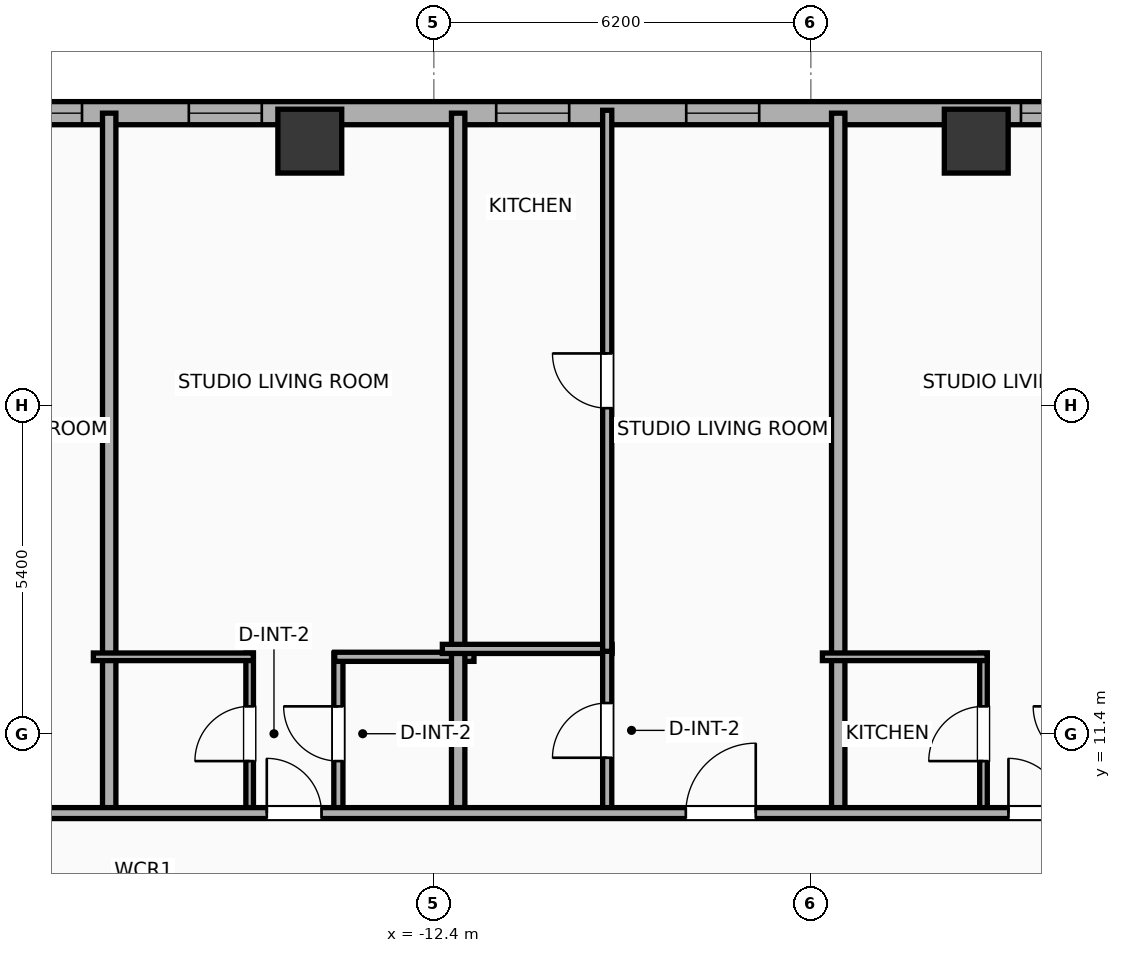
"""IFC4 building model, lengths in metres.
Left out: names, types, materials, properties, quantities, classifications, styles, units other than length and angle.
Written with IfcOpenShell. Run it as: python <this file> out.ifc"""

import sys

from ifc_helpers import new_model, si_unit, direction, frame, frame_2d, origin, origin_2d, place, context, subcontext, project, spatial, rectangle, hollow_rectangle, extrude, element, fill, save


model = new_model("IFC4")
c1 = context("Model", 3, precision=1e-05, world=origin(), true_north=direction((0.0, 1.0)))
c2 = subcontext(c1, "Body", "Model", "MODEL_VIEW")
j1 = project(units=[si_unit("LENGTHUNIT", "METRE"), si_unit("PLANEANGLEUNIT", "RADIAN")], contexts=[c1])
p1 = place(None, origin())
s1 = spatial("IfcSite", under=j1, at=p1, CompositionType="ELEMENT")
p2 = place(p1, origin())
s2 = spatial("IfcBuilding", under=s1, at=p2, CompositionType="ELEMENT")
p3 = place(p2, frame((0.0, 0.0, 124.8)))
s3 = spatial("IfcBuildingStorey", under=s2, at=p3, CompositionType="ELEMENT", Elevation=124.8)
for number, where, z_axis, x_axis in (
    (1, (-3.48, 21.15, 0.0), (0.0, 0.0, 1.0), (1.0, 0.0, 0.0)),
    (2, (-14.44, 21.15, 0.0), (0.0, 0.0, 1.0), (1.0, 0.0, 0.0)),
):
    element("IfcColumn", number, at=place(p3, frame(where, z_axis=z_axis, x_axis=x_axis)), inside=s3, PredefinedType="COLUMN", context=c2, shape_type="SweptSolid", body=[
        extrude(hollow_rectangle(XDim=1.05, YDim=1.05, WallThickness=0.036, at=origin_2d()), origin(), (0.0, 0.0, 1.0), 3.9),
    ])
p4 = place(p3, frame((-25.381, 21.61, 0.0), z_axis=(0.0, 0.0, 1.0), x_axis=(1.0, 0.0, 0.0)))
e3 = element("IfcWall", 3, at=p4, inside=s3, PredefinedType="ELEMENTEDWALL", context=c2, shape_type="SweptSolid", body=[
    extrude(rectangle(XDim=54.763, YDim=0.38, at=frame_2d((27.381, 0.0))), origin(), (0.0, 0.0, 1.0), 3.65),
])
p5 = place(p4, frame((4.795, 0.0, 0.75)))
e4 = element("IfcOpeningElement", 4, at=p5, cuts=e3, PredefinedType="OPENING", context=c2, shape_type="SweptSolid", body=[
    extrude(rectangle(XDim=2.4, YDim=2.1, at=frame_2d((1.2, 1.05))), frame((0.0, 0.2, 0.0), z_axis=(0.0, -1.0, 0.0), x_axis=(1.0, 0.0, 0.0)), (0.0, 0.0, 1.0), 0.4),
])
p6 = place(p4, frame((45.867, 0.0, 0.75)))
e5 = element("IfcOpeningElement", 5, at=p6, cuts=e3, PredefinedType="OPENING", context=c2, shape_type="SweptSolid", body=[
    extrude(rectangle(XDim=2.4, YDim=2.1, at=frame_2d((1.2, 1.05))), frame((0.0, 0.2, 0.0), z_axis=(0.0, -1.0, 0.0), x_axis=(1.0, 0.0, 0.0)), (0.0, 0.0, 1.0), 0.4),
])
p7 = place(p4, frame((2.408, 0.0, 0.75)))
e6 = element("IfcOpeningElement", 6, at=p7, cuts=e3, PredefinedType="OPENING", context=c2, shape_type="SweptSolid", body=[
    extrude(rectangle(XDim=1.2, YDim=2.05, at=frame_2d((0.6, 1.025))), frame((0.0, 0.2, 0.0), z_axis=(0.0, -1.0, 0.0), x_axis=(1.0, 0.0, 0.0)), (0.0, 0.0, 1.0), 0.4),
])
p8 = place(p4, frame((8.952, 0.0, 0.75)))
e7 = element("IfcOpeningElement", 7, at=p8, cuts=e3, PredefinedType="OPENING", context=c2, shape_type="SweptSolid", body=[
    extrude(rectangle(XDim=1.2, YDim=2.05, at=frame_2d((0.6, 1.025))), frame((0.0, 0.2, 0.0), z_axis=(0.0, -1.0, 0.0), x_axis=(1.0, 0.0, 0.0)), (0.0, 0.0, 1.0), 0.4),
])
p9 = place(p4, frame((17.132, 0.0, 0.75)))
e8 = element("IfcOpeningElement", 8, at=p9, cuts=e3, PredefinedType="OPENING", context=c2, shape_type="SweptSolid", body=[
    extrude(rectangle(XDim=1.2, YDim=2.05, at=frame_2d((0.6, 1.025))), frame((0.0, 0.2, 0.0), z_axis=(0.0, -1.0, 0.0), x_axis=(1.0, 0.0, 0.0)), (0.0, 0.0, 1.0), 0.4),
])
p10 = place(p4, frame((14.007, 0.0, 0.75)))
e9 = element("IfcOpeningElement", 9, at=p10, cuts=e3, PredefinedType="OPENING", context=c2, shape_type="SweptSolid", body=[
    extrude(rectangle(XDim=1.2, YDim=2.05, at=frame_2d((0.6, 1.025))), frame((0.0, 0.2, 0.0), z_axis=(0.0, -1.0, 0.0), x_axis=(1.0, 0.0, 0.0)), (0.0, 0.0, 1.0), 0.4),
])
p11 = place(p4, frame((22.636, 0.0, 0.75)))
e10 = element("IfcOpeningElement", 10, at=p11, cuts=e3, PredefinedType="OPENING", context=c2, shape_type="SweptSolid", body=[
    extrude(rectangle(XDim=1.2, YDim=2.05, at=frame_2d((0.6, 1.025))), frame((0.0, 0.2, 0.0), z_axis=(0.0, -1.0, 0.0), x_axis=(1.0, 0.0, 0.0)), (0.0, 0.0, 1.0), 0.4),
])
p12 = place(p4, frame((27.129, 0.0, 0.75)))
e11 = element("IfcOpeningElement", 11, at=p12, cuts=e3, PredefinedType="OPENING", context=c2, shape_type="SweptSolid", body=[
    extrude(rectangle(XDim=1.2, YDim=2.05, at=frame_2d((0.6, 1.025))), frame((0.0, 0.2, 0.0), z_axis=(0.0, -1.0, 0.0), x_axis=(1.0, 0.0, 0.0)), (0.0, 0.0, 1.0), 0.4),
])
p13 = place(p4, frame((30.254, 0.0, 0.75)))
e12 = element("IfcOpeningElement", 12, at=p13, cuts=e3, PredefinedType="OPENING", context=c2, shape_type="SweptSolid", body=[
    extrude(rectangle(XDim=1.2, YDim=2.05, at=frame_2d((0.6, 1.025))), frame((0.0, 0.2, 0.0), z_axis=(0.0, -1.0, 0.0), x_axis=(1.0, 0.0, 0.0)), (0.0, 0.0, 1.0), 0.4),
])
p14 = place(p4, frame((33.603, 0.0, 0.75)))
e13 = element("IfcOpeningElement", 13, at=p14, cuts=e3, PredefinedType="OPENING", context=c2, shape_type="SweptSolid", body=[
    extrude(rectangle(XDim=1.2, YDim=2.05, at=frame_2d((0.6, 1.025))), frame((0.0, 0.2, 0.0), z_axis=(0.0, -1.0, 0.0), x_axis=(1.0, 0.0, 0.0)), (0.0, 0.0, 1.0), 0.4),
])
p15 = place(p4, frame((36.608, 0.0, 0.75)))
e14 = element("IfcOpeningElement", 14, at=p15, cuts=e3, PredefinedType="OPENING", context=c2, shape_type="SweptSolid", body=[
    extrude(rectangle(XDim=1.2, YDim=2.05, at=frame_2d((0.6, 1.025))), frame((0.0, 0.2, 0.0), z_axis=(0.0, -1.0, 0.0), x_axis=(1.0, 0.0, 0.0)), (0.0, 0.0, 1.0), 0.4),
])
p16 = place(p4, frame((39.446, 0.0, 0.75)))
e15 = element("IfcOpeningElement", 15, at=p16, cuts=e3, PredefinedType="OPENING", context=c2, shape_type="SweptSolid", body=[
    extrude(rectangle(XDim=1.2, YDim=2.05, at=frame_2d((0.6, 1.025))), frame((0.0, 0.2, 0.0), z_axis=(0.0, -1.0, 0.0), x_axis=(1.0, 0.0, 0.0)), (0.0, 0.0, 1.0), 0.4),
])
p17 = place(p4, frame((42.27, 0.0, 0.75)))
e16 = element("IfcOpeningElement", 16, at=p17, cuts=e3, PredefinedType="OPENING", context=c2, shape_type="SweptSolid", body=[
    extrude(rectangle(XDim=0.85, YDim=2.05, at=frame_2d((0.425, 1.025))), frame((0.0, 0.2, 0.0), z_axis=(0.0, -1.0, 0.0), x_axis=(1.0, 0.0, 0.0)), (0.0, 0.0, 1.0), 0.4),
])
p18 = place(p4, frame((49.554, 0.0, 0.75)))
e17 = element("IfcOpeningElement", 17, at=p18, cuts=e3, PredefinedType="OPENING", context=c2, shape_type="SweptSolid", body=[
    extrude(rectangle(XDim=1.2, YDim=2.05, at=frame_2d((0.6, 1.025))), frame((0.0, 0.2, 0.0), z_axis=(0.0, -1.0, 0.0), x_axis=(1.0, 0.0, 0.0)), (0.0, 0.0, 1.0), 0.4),
])
p19 = place(p4, frame((52.266, 0.0, 0.75)))
e18 = element("IfcOpeningElement", 18, at=p19, cuts=e3, PredefinedType="OPENING", context=c2, shape_type="SweptSolid", body=[
    extrude(rectangle(XDim=1.2, YDim=2.05, at=frame_2d((0.6, 1.025))), frame((0.0, 0.2, 0.0), z_axis=(0.0, -1.0, 0.0), x_axis=(1.0, 0.0, 0.0)), (0.0, 0.0, 1.0), 0.4),
])
p20 = place(p3, frame((-17.739, 10.02, 0.0), z_axis=(0.0, 0.0, 1.0), x_axis=(0.0, 1.0, 0.0)))
e19 = element("IfcWall", 19, at=p20, inside=s3, PredefinedType="PARTITIONING", context=c2, shape_type="SweptSolid", body=[
    extrude(rectangle(XDim=11.59, YDim=0.22, at=frame_2d((5.795, 0.0))), origin(), (0.0, 0.0, 1.0), 3.65),
])
p21 = place(p3, frame((-15.429, 10.08, 0.0), z_axis=(0.0, 0.0, 1.0), x_axis=(0.0, 1.0, 0.0)))
e20 = element("IfcWall", 20, at=p21, inside=s3, PredefinedType="PARTITIONING", context=c2, shape_type="SweptSolid", body=[
    extrude(rectangle(XDim=2.65, YDim=0.125, at=frame_2d((1.325, 0.0))), origin(), (0.0, 0.0, 1.0), 3.04),
])
p22 = place(p21, frame((0.875, 0.0, 0.0)))
e21 = element("IfcOpeningElement", 21, at=p22, cuts=e20, PredefinedType="OPENING", context=c2, shape_type="SweptSolid", body=[
    extrude(rectangle(XDim=0.9, YDim=2.05, at=frame_2d((0.45, 1.025))), frame((0.0, 0.073, 0.0), z_axis=(0.0, -1.0, 0.0), x_axis=(1.0, 0.0, 0.0)), (0.0, 0.0, 1.0), 0.145),
])
p23 = place(p3, frame((-13.97, 10.08, 0.0), z_axis=(0.0, 0.0, 1.0), x_axis=(0.0, 1.0, 0.0)))
e22 = element("IfcWall", 22, at=p23, inside=s3, PredefinedType="PLUMBINGWALL", context=c2, shape_type="SweptSolid", body=[
    extrude(rectangle(XDim=2.65, YDim=0.15, at=frame_2d((1.325, 0.0))), origin(), (0.0, 0.0, 1.0), 3.65),
])
p24 = place(p23, frame((0.875, 0.0, 0.0)))
e23 = element("IfcOpeningElement", 23, at=p24, cuts=e22, PredefinedType="OPENING", context=c2, shape_type="SweptSolid", body=[
    extrude(rectangle(XDim=0.9, YDim=2.05, at=frame_2d((0.45, 1.025))), frame((0.0, 0.085, 0.0), z_axis=(0.0, -1.0, 0.0), x_axis=(1.0, 0.0, 0.0)), (0.0, 0.0, 1.0), 0.17),
])
p25 = place(p3, frame((-17.999, 12.67, 0.0), z_axis=(0.0, 0.0, 1.0), x_axis=(1.0, 0.0, 0.0)))
e24 = element("IfcWall", 24, at=p25, inside=s3, PredefinedType="PARTITIONING", context=c2, shape_type="SweptSolid", body=[
    extrude(rectangle(XDim=2.63, YDim=0.125, at=frame_2d((1.315, 0.0))), origin(), (0.0, 0.0, 1.0), 3.65),
])
p26 = place(p3, frame((-14.03, 12.67, 0.0), z_axis=(0.0, 0.0, 1.0), x_axis=(1.0, 0.0, 0.0)))
e25 = element("IfcWall", 25, at=p26, inside=s3, PredefinedType="PLUMBINGWALL", context=c2, shape_type="SweptSolid", body=[
    extrude(rectangle(XDim=2.29, YDim=0.15, at=frame_2d((1.145, 0.0))), origin(), (0.0, 0.0, 1.0), 3.65),
])
p27 = place(p3, frame((-12.0, 10.02, 0.0), z_axis=(0.0, 0.0, 1.0), x_axis=(0.0, 1.0, 0.0)))
e26 = element("IfcWall", 26, at=p27, inside=s3, PredefinedType="PARTITIONING", context=c2, shape_type="SweptSolid", body=[
    extrude(rectangle(XDim=11.59, YDim=0.22, at=frame_2d((5.795, 0.0))), origin(), (0.0, 0.0, 1.0), 3.65),
])
p28 = place(p3, frame((-12.26, 12.8, 0.0), z_axis=(0.0, 0.0, 1.0), x_axis=(1.0, 0.0, 0.0)))
e27 = element("IfcWall", 27, at=p28, inside=s3, PredefinedType="PLUMBINGWALL", context=c2, shape_type="SweptSolid", body=[
    extrude(rectangle(XDim=2.791, YDim=0.15, at=frame_2d((1.396, 0.0))), origin(), (0.0, 0.0, 1.0), 3.65),
])
p29 = place(p3, frame((-9.549, 10.08, 0.0), z_axis=(0.0, 0.0, 1.0), x_axis=(0.0, 1.0, 0.0)))
e28 = element("IfcWall", 28, at=p29, inside=s3, PredefinedType="PLUMBINGWALL", context=c2, shape_type="SweptSolid", body=[
    extrude(rectangle(XDim=2.76, YDim=0.15, at=frame_2d((1.38, 0.0))), origin(), (0.0, 0.0, 1.0), 3.65),
])
p30 = place(p29, frame((0.93, 0.0, 0.0)))
e29 = element("IfcOpeningElement", 29, at=p30, cuts=e28, PredefinedType="OPENING", context=c2, shape_type="SweptSolid", body=[
    extrude(rectangle(XDim=0.9, YDim=2.05, at=frame_2d((0.45, 1.025))), frame((0.0, 0.085, 0.0), z_axis=(0.0, -1.0, 0.0), x_axis=(1.0, 0.0, 0.0)), (0.0, 0.0, 1.0), 0.17),
])
p31 = place(p3, frame((-9.549, 12.76, 0.0), z_axis=(0.0, 0.0, 1.0), x_axis=(0.0, 1.0, 0.0)))
e30 = element("IfcWall", 30, at=p31, inside=s3, PredefinedType="PLUMBINGWALL", context=c2, shape_type="SweptSolid", body=[
    extrude(rectangle(XDim=8.898, YDim=0.15, at=frame_2d((4.449, 0.0))), origin(), (0.0, 0.0, 1.0), 3.65),
])
p32 = place(p31, frame((3.999, 0.0, 0.0)))
e31 = element("IfcOpeningElement", 31, at=p32, cuts=e30, PredefinedType="OPENING", context=c2, shape_type="SweptSolid", body=[
    extrude(rectangle(XDim=0.9, YDim=2.05, at=frame_2d((0.45, 1.025))), frame((0.0, 0.085, 0.0), z_axis=(0.0, -1.0, 0.0), x_axis=(1.0, 0.0, 0.0)), (0.0, 0.0, 1.0), 0.17),
])
p33 = place(p3, frame((-5.75, 10.02, 0.0), z_axis=(0.0, 0.0, 1.0), x_axis=(0.0, 1.0, 0.0)))
e32 = element("IfcWall", 32, at=p33, inside=s3, PredefinedType="PARTITIONING", context=c2, shape_type="SweptSolid", body=[
    extrude(rectangle(XDim=11.59, YDim=0.22, at=frame_2d((5.795, 0.0))), origin(), (0.0, 0.0, 1.0), 3.65),
])
p34 = place(p3, frame((-3.361, 10.08, 0.0), z_axis=(0.0, 0.0, 1.0), x_axis=(0.0, 1.0, 0.0)))
e33 = element("IfcWall", 33, at=p34, inside=s3, PredefinedType="PARTITIONING", context=c2, shape_type="SweptSolid", body=[
    extrude(rectangle(XDim=2.65, YDim=0.125, at=frame_2d((1.325, 0.0))), origin(), (0.0, 0.0, 1.0), 3.65),
])
p35 = place(p34, frame((0.875, 0.0, 0.0)))
e34 = element("IfcOpeningElement", 34, at=p35, cuts=e33, PredefinedType="OPENING", context=c2, shape_type="SweptSolid", body=[
    extrude(rectangle(XDim=0.9, YDim=2.05, at=frame_2d((0.45, 1.025))), frame((0.0, 0.073, 0.0), z_axis=(0.0, -1.0, 0.0), x_axis=(1.0, 0.0, 0.0)), (0.0, 0.0, 1.0), 0.145),
])
p36 = place(p3, frame((-6.01, 12.67, 0.0), z_axis=(0.0, 0.0, 1.0), x_axis=(1.0, 0.0, 0.0)))
e35 = element("IfcWall", 35, at=p36, inside=s3, PredefinedType="PARTITIONING", context=c2, shape_type="SweptSolid", body=[
    extrude(rectangle(XDim=2.709, YDim=0.125, at=frame_2d((1.354, 0.0))), origin(), (0.0, 0.0, 1.0), 3.65),
])
p37 = place(p3, frame((-29.21, 10.1, 0.0), z_axis=(0.0, 0.0, 1.0), x_axis=(1.0, 0.0, 0.0)))
e36 = element("IfcWall", 36, at=p37, inside=s3, PredefinedType="PARTITIONING", context=c2, shape_type="SweptSolid", body=[
    extrude(rectangle(XDim=62.42, YDim=0.18, at=frame_2d((31.21, 0.0))), origin(), (0.0, 0.0, 1.0), 3.65),
])
p38 = place(p37, frame((2.54, 0.0, 0.0)))
e37 = element("IfcOpeningElement", 37, at=p38, cuts=e36, PredefinedType="OPENING", context=c2, shape_type="SweptSolid", body=[
    extrude(rectangle(XDim=0.9, YDim=2.05, at=frame_2d((0.45, 1.025))), frame((0.0, 0.1, 0.0), z_axis=(0.0, -1.0, 0.0), x_axis=(1.0, 0.0, 0.0)), (0.0, 0.0, 1.0), 0.2),
])
p39 = place(p37, frame((9.1, 0.0, 0.0)))
e38 = element("IfcOpeningElement", 38, at=p39, cuts=e36, PredefinedType="OPENING", context=c2, shape_type="SweptSolid", body=[
    extrude(rectangle(XDim=1.15, YDim=2.05, at=frame_2d((0.575, 1.025))), frame((0.0, 0.1, 0.0), z_axis=(0.0, -1.0, 0.0), x_axis=(1.0, 0.0, 0.0)), (0.0, 0.0, 1.0), 0.2),
])
p40 = place(p37, frame((14.063, 0.0, 0.0)))
e39 = element("IfcOpeningElement", 39, at=p40, cuts=e36, PredefinedType="OPENING", context=c2, shape_type="SweptSolid", body=[
    extrude(rectangle(XDim=0.9, YDim=2.05, at=frame_2d((0.45, 1.025))), frame((0.0, 0.1, 0.0), z_axis=(0.0, -1.0, 0.0), x_axis=(1.0, 0.0, 0.0)), (0.0, 0.0, 1.0), 0.2),
])
p41 = place(p37, frame((20.954, 0.0, 0.0)))
e40 = element("IfcOpeningElement", 40, at=p41, cuts=e36, PredefinedType="OPENING", context=c2, shape_type="SweptSolid", body=[
    extrude(rectangle(XDim=1.15, YDim=2.05, at=frame_2d((0.575, 1.025))), frame((0.0, 0.1, 0.0), z_axis=(0.0, -1.0, 0.0), x_axis=(1.0, 0.0, 0.0)), (0.0, 0.0, 1.0), 0.2),
])
p42 = place(p37, frame((26.26, 0.0, 0.0)))
e41 = element("IfcOpeningElement", 41, at=p42, cuts=e36, PredefinedType="OPENING", context=c2, shape_type="SweptSolid", body=[
    extrude(rectangle(XDim=0.9, YDim=2.05, at=frame_2d((0.45, 1.025))), frame((0.0, 0.1, 0.0), z_axis=(0.0, -1.0, 0.0), x_axis=(1.0, 0.0, 0.0)), (0.0, 0.0, 1.0), 0.2),
])
p43 = place(p37, frame((31.01, 0.0, 0.0)))
e42 = element("IfcOpeningElement", 42, at=p43, cuts=e36, PredefinedType="OPENING", context=c2, shape_type="SweptSolid", body=[
    extrude(rectangle(XDim=1.15, YDim=2.05, at=frame_2d((0.575, 1.025))), frame((0.0, 0.1, 0.0), z_axis=(0.0, -1.0, 0.0), x_axis=(1.0, 0.0, 0.0)), (0.0, 0.0, 1.0), 0.2),
])
p44 = place(p37, frame((37.37, 0.0, 0.0)))
e43 = element("IfcOpeningElement", 43, at=p44, cuts=e36, PredefinedType="OPENING", context=c2, shape_type="SweptSolid", body=[
    extrude(rectangle(XDim=1.15, YDim=2.05, at=frame_2d((0.575, 1.025))), frame((0.0, 0.1, 0.0), z_axis=(0.0, -1.0, 0.0), x_axis=(1.0, 0.0, 0.0)), (0.0, 0.0, 1.0), 0.2),
])
p45 = place(p37, frame((45.298, 0.0, 0.0)))
e44 = element("IfcOpeningElement", 44, at=p45, cuts=e36, PredefinedType="OPENING", context=c2, shape_type="SweptSolid", body=[
    extrude(rectangle(XDim=0.9, YDim=2.05, at=frame_2d((0.45, 1.025))), frame((0.0, 0.1, 0.0), z_axis=(0.0, -1.0, 0.0), x_axis=(1.0, 0.0, 0.0)), (0.0, 0.0, 1.0), 0.2),
])
p46 = place(p37, frame((52.033, 0.0, 0.0)))
e45 = element("IfcOpeningElement", 45, at=p46, cuts=e36, PredefinedType="OPENING", context=c2, shape_type="SweptSolid", body=[
    extrude(rectangle(XDim=0.9, YDim=2.05, at=frame_2d((0.45, 1.025))), frame((0.0, 0.1, 0.0), z_axis=(0.0, -1.0, 0.0), x_axis=(1.0, 0.0, 0.0)), (0.0, 0.0, 1.0), 0.2),
])
p47 = place(p37, frame((58.805, 0.0, 0.0)))
e46 = element("IfcOpeningElement", 46, at=p47, cuts=e36, PredefinedType="OPENING", context=c2, shape_type="SweptSolid", body=[
    extrude(rectangle(XDim=0.9, YDim=2.05, at=frame_2d((0.45, 1.025))), frame((0.0, 0.1, 0.0), z_axis=(0.0, -1.0, 0.0), x_axis=(1.0, 0.0, 0.0)), (0.0, 0.0, 1.0), 0.2),
])
p48 = place(p5, origin())
e47 = element("IfcWindow", 47, at=p48, inside=s3, PartitioningType="SINGLE_PANEL", PredefinedType="WINDOW", context=c2, shape_type="SweptSolid", body=[
    extrude(rectangle(XDim=2.4, YDim=2.1, at=frame_2d((1.2, 1.05))), frame((0.0, 0.03, 0.0), z_axis=(0.0, -1.0, 0.0), x_axis=(1.0, 0.0, 0.0)), (0.0, 0.0, 1.0), 0.06),
])
fill(e4, e47)
p49 = place(p8, origin())
e48 = element("IfcWindow", 48, at=p49, inside=s3, PartitioningType="SINGLE_PANEL", PredefinedType="WINDOW", context=c2, shape_type="SweptSolid", body=[
    extrude(rectangle(XDim=1.2, YDim=2.05, at=frame_2d((0.6, 1.025))), frame((0.0, 0.03, 0.0), z_axis=(0.0, -1.0, 0.0), x_axis=(1.0, 0.0, 0.0)), (0.0, 0.0, 1.0), 0.06),
])
fill(e7, e48)
p50 = place(p9, origin())
e49 = element("IfcWindow", 49, at=p50, inside=s3, PartitioningType="SINGLE_PANEL", PredefinedType="WINDOW", context=c2, shape_type="SweptSolid", body=[
    extrude(rectangle(XDim=1.2, YDim=2.05, at=frame_2d((0.6, 1.025))), frame((0.0, 0.03, 0.0), z_axis=(0.0, -1.0, 0.0), x_axis=(1.0, 0.0, 0.0)), (0.0, 0.0, 1.0), 0.06),
])
fill(e8, e49)
p51 = place(p10, origin())
e50 = element("IfcWindow", 50, at=p51, inside=s3, PartitioningType="SINGLE_PANEL", PredefinedType="WINDOW", context=c2, shape_type="SweptSolid", body=[
    extrude(rectangle(XDim=1.2, YDim=2.05, at=frame_2d((0.6, 1.025))), frame((0.0, 0.03, 0.0), z_axis=(0.0, -1.0, 0.0), x_axis=(1.0, 0.0, 0.0)), (0.0, 0.0, 1.0), 0.06),
])
fill(e9, e50)
p52 = place(p11, origin())
e51 = element("IfcWindow", 51, at=p52, inside=s3, PartitioningType="SINGLE_PANEL", PredefinedType="WINDOW", context=c2, shape_type="SweptSolid", body=[
    extrude(rectangle(XDim=1.2, YDim=2.05, at=frame_2d((0.6, 1.025))), frame((0.0, 0.03, 0.0), z_axis=(0.0, -1.0, 0.0), x_axis=(1.0, 0.0, 0.0)), (0.0, 0.0, 1.0), 0.06),
])
fill(e10, e51)
p53 = place(p22, origin())
e52 = element("IfcDoor", 52, at=p53, inside=s3, OperationType="SINGLE_SWING_LEFT", PredefinedType="DOOR", context=c2, shape_type="SweptSolid", body=[
    extrude(rectangle(XDim=0.9, YDim=2.05, at=frame_2d((0.45, 1.025))), frame((0.0, 0.025, 0.0), z_axis=(0.0, -1.0, 0.0), x_axis=(1.0, 0.0, 0.0)), (0.0, 0.0, 1.0), 0.05),
])
fill(e21, e52)
p54 = place(p24, origin())
e53 = element("IfcDoor", 53, at=p54, inside=s3, OperationType="SINGLE_SWING_RIGHT", PredefinedType="DOOR", context=c2, shape_type="SweptSolid", body=[
    extrude(rectangle(XDim=0.9, YDim=2.05, at=frame_2d((0.45, 1.025))), frame((0.0, 0.025, 0.0), z_axis=(0.0, -1.0, 0.0), x_axis=(1.0, 0.0, 0.0)), (0.0, 0.0, 1.0), 0.05),
])
fill(e23, e53)
p55 = place(p30, origin())
e54 = element("IfcDoor", 54, at=p55, inside=s3, OperationType="SINGLE_SWING_LEFT", PredefinedType="DOOR", context=c2, shape_type="SweptSolid", body=[
    extrude(rectangle(XDim=0.9, YDim=2.05, at=frame_2d((0.45, 1.025))), frame((0.0, 0.025, 0.0), z_axis=(0.0, -1.0, 0.0), x_axis=(1.0, 0.0, 0.0)), (0.0, 0.0, 1.0), 0.05),
])
fill(e29, e54)
p56 = place(p32, origin())
e55 = element("IfcDoor", 55, at=p56, inside=s3, OperationType="SINGLE_SWING_RIGHT", PredefinedType="DOOR", context=c2, shape_type="SweptSolid", body=[
    extrude(rectangle(XDim=0.9, YDim=2.05, at=frame_2d((0.45, 1.025))), frame((0.0, 0.025, 0.0), z_axis=(0.0, -1.0, 0.0), x_axis=(1.0, 0.0, 0.0)), (0.0, 0.0, 1.0), 0.05),
])
fill(e31, e55)
p57 = place(p35, origin())
e56 = element("IfcDoor", 56, at=p57, inside=s3, OperationType="SINGLE_SWING_LEFT", PredefinedType="DOOR", context=c2, shape_type="SweptSolid", body=[
    extrude(rectangle(XDim=0.9, YDim=2.05, at=frame_2d((0.45, 1.025))), frame((0.0, 0.025, 0.0), z_axis=(0.0, -1.0, 0.0), x_axis=(1.0, 0.0, 0.0)), (0.0, 0.0, 1.0), 0.05),
])
fill(e34, e56)
p58 = place(p40, origin())
e57 = element("IfcDoor", 57, at=p58, inside=s3, OperationType="SINGLE_SWING_LEFT", PredefinedType="DOOR", context=c2, shape_type="SweptSolid", body=[
    extrude(rectangle(XDim=0.9, YDim=2.05, at=frame_2d((0.45, 1.025))), frame((0.0, 0.025, 0.0), z_axis=(0.0, -1.0, 0.0), x_axis=(1.0, 0.0, 0.0)), (0.0, 0.0, 1.0), 0.05),
])
fill(e39, e57)
p59 = place(p41, origin())
e58 = element("IfcDoor", 58, at=p59, inside=s3, OperationType="SINGLE_SWING_RIGHT", PredefinedType="DOOR", context=c2, shape_type="SweptSolid", body=[
    extrude(rectangle(XDim=1.15, YDim=2.05, at=frame_2d((0.575, 1.025))), frame((0.0, 0.025, 0.0), z_axis=(0.0, -1.0, 0.0), x_axis=(1.0, 0.0, 0.0)), (0.0, 0.0, 1.0), 0.05),
])
fill(e40, e58)
p60 = place(p42, origin())
e59 = element("IfcDoor", 59, at=p60, inside=s3, OperationType="SINGLE_SWING_LEFT", PredefinedType="DOOR", context=c2, shape_type="SweptSolid", body=[
    extrude(rectangle(XDim=0.9, YDim=2.05, at=frame_2d((0.45, 1.025))), frame((0.0, 0.025, 0.0), z_axis=(0.0, -1.0, 0.0), x_axis=(1.0, 0.0, 0.0)), (0.0, 0.0, 1.0), 0.05),
])
fill(e41, e59)
save(model, sys.argv[1])
